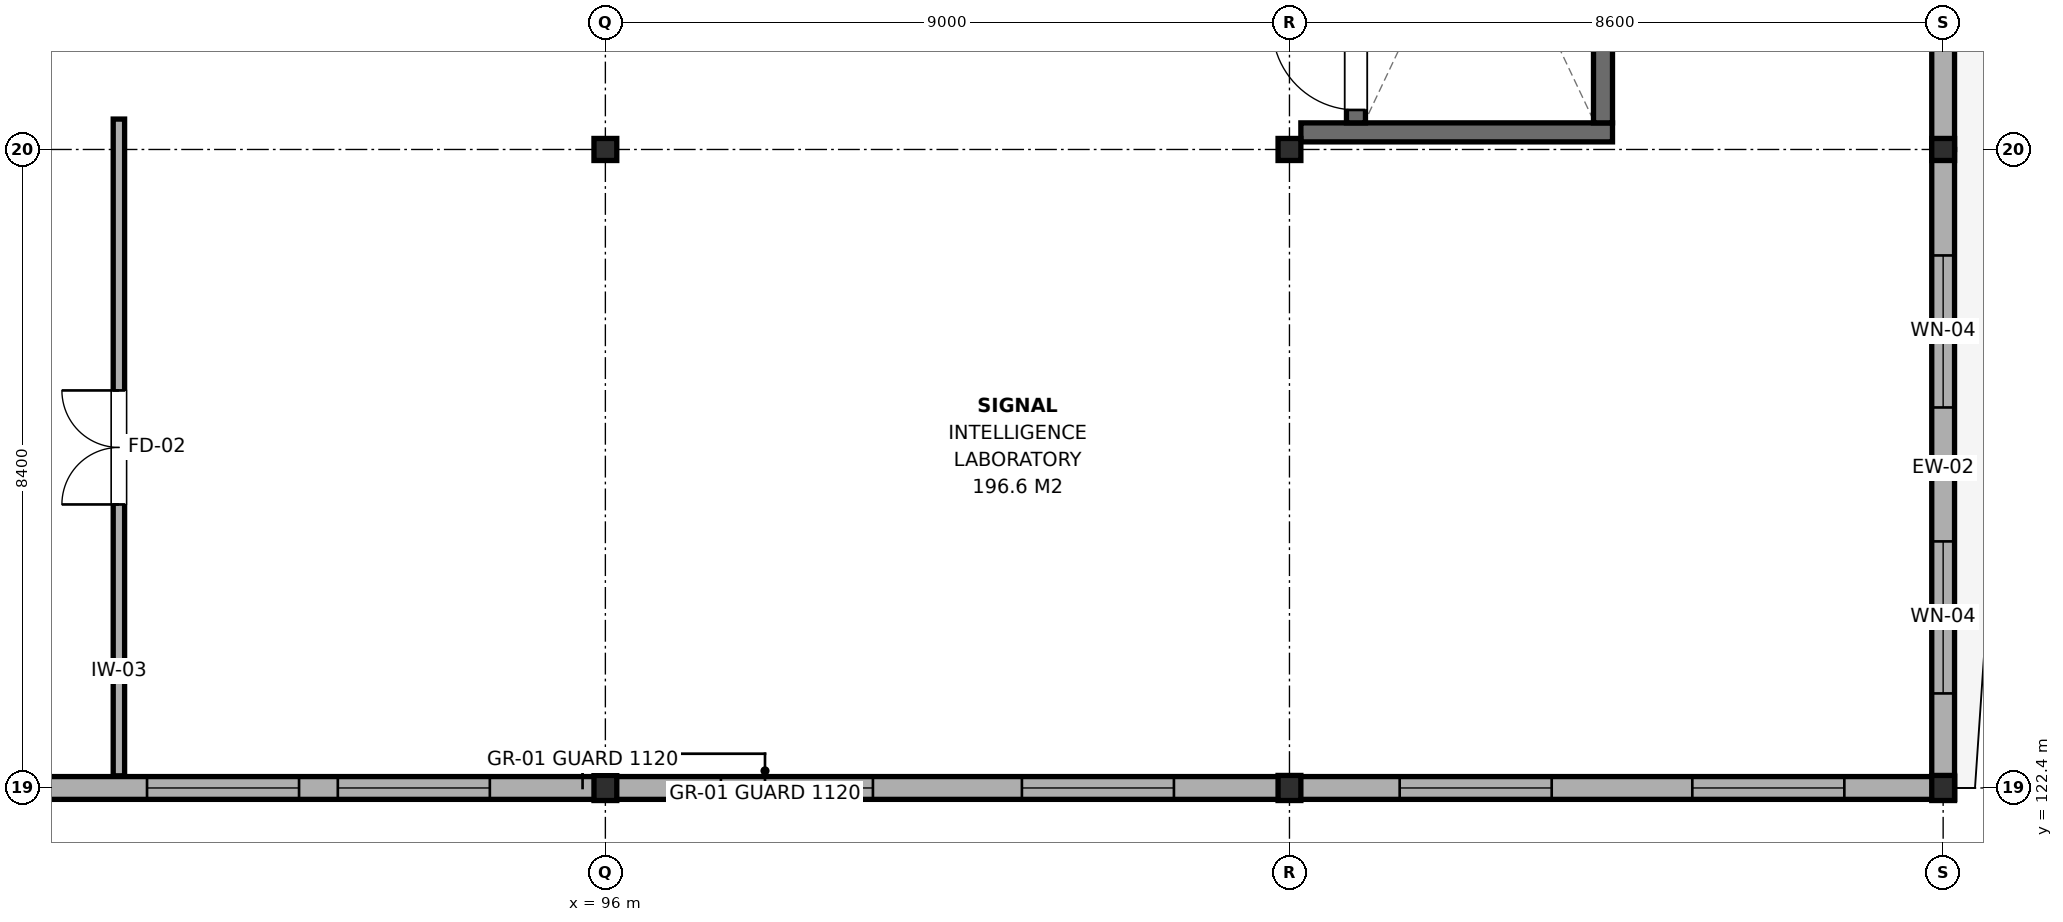
"""IFC4 building model, lengths in metres.
Left out: names, types, materials, properties, quantities, classifications, styles, units other than length and angle.
Written with IfcOpenShell. Run it as: python <this file> out.ifc"""

import sys

from ifc_helpers import new_model, si_unit, direction, frame, frame_2d, origin, origin_2d, place, context, subcontext, project, spatial, rectangle, i_section, extrude, element, fill, save


model = new_model("IFC4")
c1 = context("Model", 3, precision=1e-05, world=origin(), true_north=direction((0.0, 1.0)))
c2 = subcontext(c1, "Body", "Model", "MODEL_VIEW")
j1 = project(units=[si_unit("LENGTHUNIT", "METRE"), si_unit("PLANEANGLEUNIT", "RADIAN")], contexts=[c1])
p1 = place(None, origin())
s1 = spatial("IfcSite", under=j1, at=p1, CompositionType="ELEMENT")
p2 = place(p1, origin())
s2 = spatial("IfcBuilding", under=s1, at=p2, CompositionType="ELEMENT")
p3 = place(p2, frame((0.0, 0.0, 21.0)))
s3 = spatial("IfcBuildingStorey", under=s2, at=p3, CompositionType="ELEMENT", Elevation=21.0)
p4 = place(p3, frame((96.0, 122.4, 0.0), z_axis=(0.0, 0.0, 1.0), x_axis=(1.0, 0.0, 0.0)))
e1 = element("IfcColumn", 1, at=p4, inside=s3, PredefinedType="COLUMN", context=c2, shape_type="SweptSolid", body=[
    extrude(i_section(OverallWidth=0.3, OverallDepth=0.33, WebThickness=0.01, FlangeThickness=0.017, FilletRadius=0.027, at=origin_2d()), origin(), (0.0, 0.0, 1.0), 3.7),
])
p5 = place(p3, frame((96.0, 130.8, 0.0), z_axis=(0.0, 0.0, 1.0), x_axis=(1.0, 0.0, 0.0)))
e2 = element("IfcColumn", 2, at=p5, inside=s3, PredefinedType="COLUMN", context=c2, shape_type="SweptSolid", body=[
    extrude(i_section(OverallWidth=0.3, OverallDepth=0.29, WebThickness=0.009, FlangeThickness=0.014, FilletRadius=0.027, at=origin_2d()), origin(), (0.0, 0.0, 1.0), 3.7),
])
p6 = place(p3, frame((105.0, 122.4, 0.0), z_axis=(0.0, 0.0, 1.0), x_axis=(1.0, 0.0, 0.0)))
e3 = element("IfcColumn", 3, at=p6, inside=s3, PredefinedType="COLUMN", context=c2, shape_type="SweptSolid", body=[
    extrude(i_section(OverallWidth=0.3, OverallDepth=0.33, WebThickness=0.01, FlangeThickness=0.017, FilletRadius=0.027, at=origin_2d()), origin(), (0.0, 0.0, 1.0), 3.7),
])
p7 = place(p3, frame((105.0, 130.8, 0.0), z_axis=(0.0, 0.0, 1.0), x_axis=(1.0, 0.0, 0.0)))
e4 = element("IfcColumn", 4, at=p7, inside=s3, PredefinedType="COLUMN", context=c2, shape_type="SweptSolid", body=[
    extrude(i_section(OverallWidth=0.3, OverallDepth=0.29, WebThickness=0.009, FlangeThickness=0.014, FilletRadius=0.027, at=origin_2d()), origin(), (0.0, 0.0, 1.0), 3.7),
])
p8 = place(p3, frame((113.6, 122.4, 0.0), z_axis=(0.0, 0.0, 1.0), x_axis=(1.0, 0.0, 0.0)))
e5 = element("IfcColumn", 5, at=p8, inside=s3, PredefinedType="COLUMN", context=c2, shape_type="SweptSolid", body=[
    extrude(i_section(OverallWidth=0.3, OverallDepth=0.33, WebThickness=0.01, FlangeThickness=0.017, FilletRadius=0.027, at=origin_2d()), origin(), (0.0, 0.0, 1.0), 3.7),
])
p9 = place(p3, frame((113.6, 130.8, 0.0), z_axis=(0.0, 0.0, 1.0), x_axis=(1.0, 0.0, 0.0)))
e6 = element("IfcColumn", 6, at=p9, inside=s3, PredefinedType="COLUMN", context=c2, shape_type="SweptSolid", body=[
    extrude(i_section(OverallWidth=0.3, OverallDepth=0.29, WebThickness=0.009, FlangeThickness=0.014, FilletRadius=0.027, at=origin_2d()), origin(), (0.0, 0.0, 1.0), 3.7),
])
p10 = place(p3, frame((105.15, 131.025, 0.0), z_axis=(0.0, 0.0, 1.0), x_axis=(1.0, 0.0, 0.0)))
e7 = element("IfcWall", 7, at=p10, inside=s3, PredefinedType="SHEAR", context=c2, shape_type="SweptSolid", body=[
    extrude(rectangle(XDim=4.1, YDim=0.25, at=frame_2d((2.05, 0.0))), origin(), (0.0, 0.0, 1.0), 3.7),
])
p11 = place(p3, frame((105.875, 131.15, 0.0), z_axis=(0.0, 0.0, 1.0), x_axis=(0.0, 1.0, 0.0)))
e8 = element("IfcWall", 8, at=p11, inside=s3, PredefinedType="SHEAR", context=c2, shape_type="SweptSolid", body=[
    extrude(rectangle(XDim=6.4, YDim=0.25, at=frame_2d((3.2, 0.0))), origin(), (0.0, 0.0, 1.0), 3.7),
])
p12 = place(p11, frame((0.17, 0.0, 0.0)))
e9 = element("IfcOpeningElement", 9, at=p12, cuts=e8, PredefinedType="OPENING", context=c2, shape_type="SweptSolid", body=[
    extrude(rectangle(XDim=1.1, YDim=2.15, at=frame_2d((0.55, 1.075))), frame((0.0, 0.14, 0.0), z_axis=(0.0, -1.0, 0.0), x_axis=(1.0, 0.0, 0.0)), (0.0, 0.0, 1.0), 0.28),
])
p13 = place(p3, frame((109.125, 131.15, 0.0), z_axis=(0.0, 0.0, 1.0), x_axis=(0.0, 1.0, 0.0)))
e10 = element("IfcWall", 10, at=p13, inside=s3, PredefinedType="SHEAR", context=c2, shape_type="SweptSolid", body=[
    extrude(rectangle(XDim=6.4, YDim=0.25, at=frame_2d((3.2, 0.0))), origin(), (0.0, 0.0, 1.0), 3.7),
])
p14 = place(p3, frame((113.6, 122.25, 0.0), z_axis=(0.0, 0.0, 1.0), x_axis=(0.0, 1.0, 0.0)))
e11 = element("IfcWall", 11, at=p14, inside=s3, PredefinedType="SOLIDWALL", context=c2, shape_type="SweptSolid", body=[
    extrude(rectangle(XDim=8.55, YDim=0.3, at=frame_2d((4.275, 0.0))), origin(), (0.0, 0.0, 1.0), 3.195),
])
p15 = place(p14, frame((1.394, 0.0, 0.65)))
e12 = element("IfcOpeningElement", 12, at=p15, cuts=e11, PredefinedType="OPENING", context=c2, shape_type="SweptSolid", body=[
    extrude(rectangle(XDim=2.0, YDim=1.8, at=frame_2d((1.0, 0.9))), frame((0.0, 0.165, 0.0), z_axis=(0.0, -1.0, 0.0), x_axis=(1.0, 0.0, 0.0)), (0.0, 0.0, 1.0), 0.33),
])
p16 = place(p14, frame((5.156, 0.0, 0.65)))
e13 = element("IfcOpeningElement", 13, at=p16, cuts=e11, PredefinedType="OPENING", context=c2, shape_type="SweptSolid", body=[
    extrude(rectangle(XDim=2.0, YDim=1.8, at=frame_2d((1.0, 0.9))), frame((0.0, 0.165, 0.0), z_axis=(0.0, -1.0, 0.0), x_axis=(1.0, 0.0, 0.0)), (0.0, 0.0, 1.0), 0.33),
])
p17 = place(p3, frame((113.6, 130.8, 0.0), z_axis=(0.0, 0.0, 1.0), x_axis=(0.0, 1.0, 0.0)))
e14 = element("IfcWall", 14, at=p17, inside=s3, PredefinedType="SOLIDWALL", context=c2, shape_type="SweptSolid", body=[
    extrude(rectangle(XDim=7.2, YDim=0.3, at=frame_2d((3.6, 0.0))), origin(), (0.0, 0.0, 1.0), 3.195),
])
p18 = place(p17, frame((2.7, 0.0, 0.65)))
e15 = element("IfcOpeningElement", 15, at=p18, cuts=e14, PredefinedType="OPENING", context=c2, shape_type="SweptSolid", body=[
    extrude(rectangle(XDim=1.8, YDim=1.2, at=frame_2d((0.9, 0.6))), frame((0.0, 0.165, 0.0), z_axis=(0.0, -1.0, 0.0), x_axis=(1.0, 0.0, 0.0)), (0.0, 0.0, 1.0), 0.33),
])
p19 = place(p3, frame((87.0, 122.4, 0.0), z_axis=(0.0, 0.0, 1.0), x_axis=(1.0, 0.0, 0.0)))
e16 = element("IfcWall", 16, at=p19, inside=s3, PredefinedType="SOLIDWALL", context=c2, shape_type="SweptSolid", body=[
    extrude(rectangle(XDim=9.0, YDim=0.3, at=frame_2d((4.5, 0.0))), origin(), (0.0, 0.0, 1.0), 3.105),
])
p20 = place(p19, frame((2.97, 0.0, 0.65)))
e17 = element("IfcOpeningElement", 17, at=p20, cuts=e16, PredefinedType="OPENING", context=c2, shape_type="SweptSolid", body=[
    extrude(rectangle(XDim=2.0, YDim=1.8, at=frame_2d((1.0, 0.9))), frame((0.0, 0.165, 0.0), z_axis=(0.0, -1.0, 0.0), x_axis=(1.0, 0.0, 0.0)), (0.0, 0.0, 1.0), 0.33),
])
p21 = place(p19, frame((5.48, 0.0, 0.65)))
e18 = element("IfcOpeningElement", 18, at=p21, cuts=e16, PredefinedType="OPENING", context=c2, shape_type="SweptSolid", body=[
    extrude(rectangle(XDim=2.0, YDim=1.8, at=frame_2d((1.0, 0.9))), frame((0.0, 0.165, 0.0), z_axis=(0.0, -1.0, 0.0), x_axis=(1.0, 0.0, 0.0)), (0.0, 0.0, 1.0), 0.33),
])
p22 = place(p3, frame((96.0, 122.4, 0.0), z_axis=(0.0, 0.0, 1.0), x_axis=(1.0, 0.0, 0.0)))
e19 = element("IfcWall", 19, at=p22, inside=s3, PredefinedType="SOLIDWALL", context=c2, shape_type="SweptSolid", body=[
    extrude(rectangle(XDim=9.0, YDim=0.3, at=frame_2d((4.5, 0.0))), origin(), (0.0, 0.0, 1.0), 3.105),
])
p23 = place(p22, frame((1.52, 0.0, 0.65)))
e20 = element("IfcOpeningElement", 20, at=p23, cuts=e19, PredefinedType="OPENING", context=c2, shape_type="SweptSolid", body=[
    extrude(rectangle(XDim=2.0, YDim=1.8, at=frame_2d((1.0, 0.9))), frame((0.0, 0.165, 0.0), z_axis=(0.0, -1.0, 0.0), x_axis=(1.0, 0.0, 0.0)), (0.0, 0.0, 1.0), 0.33),
])
p24 = place(p22, frame((5.48, 0.0, 0.65)))
e21 = element("IfcOpeningElement", 21, at=p24, cuts=e19, PredefinedType="OPENING", context=c2, shape_type="SweptSolid", body=[
    extrude(rectangle(XDim=2.0, YDim=1.8, at=frame_2d((1.0, 0.9))), frame((0.0, 0.165, 0.0), z_axis=(0.0, -1.0, 0.0), x_axis=(1.0, 0.0, 0.0)), (0.0, 0.0, 1.0), 0.33),
])
p25 = place(p3, frame((105.0, 122.4, 0.0), z_axis=(0.0, 0.0, 1.0), x_axis=(1.0, 0.0, 0.0)))
e22 = element("IfcWall", 22, at=p25, inside=s3, PredefinedType="SOLIDWALL", context=c2, shape_type="SweptSolid", body=[
    extrude(rectangle(XDim=8.75, YDim=0.3, at=frame_2d((4.375, 0.0))), origin(), (0.0, 0.0, 1.0), 3.105),
])
p26 = place(p25, frame((1.45, 0.0, 0.65)))
e23 = element("IfcOpeningElement", 23, at=p26, cuts=e22, PredefinedType="OPENING", context=c2, shape_type="SweptSolid", body=[
    extrude(rectangle(XDim=2.0, YDim=1.8, at=frame_2d((1.0, 0.9))), frame((0.0, 0.165, 0.0), z_axis=(0.0, -1.0, 0.0), x_axis=(1.0, 0.0, 0.0)), (0.0, 0.0, 1.0), 0.33),
])
p27 = place(p25, frame((5.3, 0.0, 0.65)))
e24 = element("IfcOpeningElement", 24, at=p27, cuts=e22, PredefinedType="OPENING", context=c2, shape_type="SweptSolid", body=[
    extrude(rectangle(XDim=2.0, YDim=1.8, at=frame_2d((1.0, 0.9))), frame((0.0, 0.165, 0.0), z_axis=(0.0, -1.0, 0.0), x_axis=(1.0, 0.0, 0.0)), (0.0, 0.0, 1.0), 0.33),
])
p28 = place(p3, frame((89.6, 122.56, 0.0), z_axis=(0.0, 0.0, 1.0), x_axis=(0.0, 1.0, 0.0)))
e25 = element("IfcWall", 25, at=p28, inside=s3, PredefinedType="PARTITIONING", context=c2, shape_type="SweptSolid", body=[
    extrude(rectangle(XDim=8.64, YDim=0.15, at=frame_2d((4.32, 0.0))), origin(), (0.0, 0.0, 1.0), 3.105),
])
p29 = place(p28, frame((3.57, 0.0, 0.0)))
e26 = element("IfcOpeningElement", 26, at=p29, cuts=e25, PredefinedType="OPENING", context=c2, shape_type="SweptSolid", body=[
    extrude(rectangle(XDim=1.5, YDim=2.15, at=frame_2d((0.75, 1.075))), frame((0.0, 0.09, 0.0), z_axis=(0.0, -1.0, 0.0), x_axis=(1.0, 0.0, 0.0)), (0.0, 0.0, 1.0), 0.18),
])
p30 = place(p15, origin())
e27 = element("IfcWindow", 27, at=p30, inside=s3, PartitioningType="SINGLE_PANEL", PredefinedType="WINDOW", context=c2, shape_type="SweptSolid", body=[
    extrude(rectangle(XDim=2.0, YDim=1.8, at=frame_2d((1.0, 0.9))), frame((0.0, 0.03, 0.0), z_axis=(0.0, -1.0, 0.0), x_axis=(1.0, 0.0, 0.0)), (0.0, 0.0, 1.0), 0.06),
])
fill(e12, e27)
p31 = place(p16, origin())
e28 = element("IfcWindow", 28, at=p31, inside=s3, PartitioningType="SINGLE_PANEL", PredefinedType="WINDOW", context=c2, shape_type="SweptSolid", body=[
    extrude(rectangle(XDim=2.0, YDim=1.8, at=frame_2d((1.0, 0.9))), frame((0.0, 0.03, 0.0), z_axis=(0.0, -1.0, 0.0), x_axis=(1.0, 0.0, 0.0)), (0.0, 0.0, 1.0), 0.06),
])
fill(e13, e28)
p32 = place(p20, origin())
e29 = element("IfcWindow", 29, at=p32, inside=s3, PartitioningType="SINGLE_PANEL", PredefinedType="WINDOW", context=c2, shape_type="SweptSolid", body=[
    extrude(rectangle(XDim=2.0, YDim=1.8, at=frame_2d((1.0, 0.9))), frame((0.0, 0.03, 0.0), z_axis=(0.0, -1.0, 0.0), x_axis=(1.0, 0.0, 0.0)), (0.0, 0.0, 1.0), 0.06),
])
fill(e17, e29)
p33 = place(p21, origin())
e30 = element("IfcWindow", 30, at=p33, inside=s3, PartitioningType="SINGLE_PANEL", PredefinedType="WINDOW", context=c2, shape_type="SweptSolid", body=[
    extrude(rectangle(XDim=2.0, YDim=1.8, at=frame_2d((1.0, 0.9))), frame((0.0, 0.03, 0.0), z_axis=(0.0, -1.0, 0.0), x_axis=(1.0, 0.0, 0.0)), (0.0, 0.0, 1.0), 0.06),
])
fill(e18, e30)
p34 = place(p23, origin())
e31 = element("IfcWindow", 31, at=p34, inside=s3, PartitioningType="SINGLE_PANEL", PredefinedType="WINDOW", context=c2, shape_type="SweptSolid", body=[
    extrude(rectangle(XDim=2.0, YDim=1.8, at=frame_2d((1.0, 0.9))), frame((0.0, 0.03, 0.0), z_axis=(0.0, -1.0, 0.0), x_axis=(1.0, 0.0, 0.0)), (0.0, 0.0, 1.0), 0.06),
])
fill(e20, e31)
p35 = place(p24, origin())
e32 = element("IfcWindow", 32, at=p35, inside=s3, PartitioningType="SINGLE_PANEL", PredefinedType="WINDOW", context=c2, shape_type="SweptSolid", body=[
    extrude(rectangle(XDim=2.0, YDim=1.8, at=frame_2d((1.0, 0.9))), frame((0.0, 0.03, 0.0), z_axis=(0.0, -1.0, 0.0), x_axis=(1.0, 0.0, 0.0)), (0.0, 0.0, 1.0), 0.06),
])
fill(e21, e32)
p36 = place(p26, origin())
e33 = element("IfcWindow", 33, at=p36, inside=s3, PartitioningType="SINGLE_PANEL", PredefinedType="WINDOW", context=c2, shape_type="SweptSolid", body=[
    extrude(rectangle(XDim=2.0, YDim=1.8, at=frame_2d((1.0, 0.9))), frame((0.0, 0.03, 0.0), z_axis=(0.0, -1.0, 0.0), x_axis=(1.0, 0.0, 0.0)), (0.0, 0.0, 1.0), 0.06),
])
fill(e23, e33)
p37 = place(p27, origin())
e34 = element("IfcWindow", 34, at=p37, inside=s3, PartitioningType="SINGLE_PANEL", PredefinedType="WINDOW", context=c2, shape_type="SweptSolid", body=[
    extrude(rectangle(XDim=2.0, YDim=1.8, at=frame_2d((1.0, 0.9))), frame((0.0, 0.03, 0.0), z_axis=(0.0, -1.0, 0.0), x_axis=(1.0, 0.0, 0.0)), (0.0, 0.0, 1.0), 0.06),
])
fill(e24, e34)
p38 = place(p12, origin())
e35 = element("IfcDoor", 35, at=p38, inside=s3, OperationType="SINGLE_SWING_RIGHT", PredefinedType="DOOR", context=c2, shape_type="SweptSolid", body=[
    extrude(rectangle(XDim=1.1, YDim=2.15, at=frame_2d((0.55, 1.075))), frame((0.0, 0.025, 0.0), z_axis=(0.0, -1.0, 0.0), x_axis=(1.0, 0.0, 0.0)), (0.0, 0.0, 1.0), 0.05),
])
fill(e9, e35)
p39 = place(p29, origin())
e36 = element("IfcDoor", 36, at=p39, inside=s3, OperationType="DOUBLE_DOOR_SINGLE_SWING", PredefinedType="DOOR", context=c2, shape_type="SweptSolid", body=[
    extrude(rectangle(XDim=1.5, YDim=2.15, at=frame_2d((0.75, 1.075))), frame((0.0, 0.025, 0.0), z_axis=(0.0, -1.0, 0.0), x_axis=(1.0, 0.0, 0.0)), (0.0, 0.0, 1.0), 0.05),
])
fill(e26, e36)
save(model, sys.argv[1])
